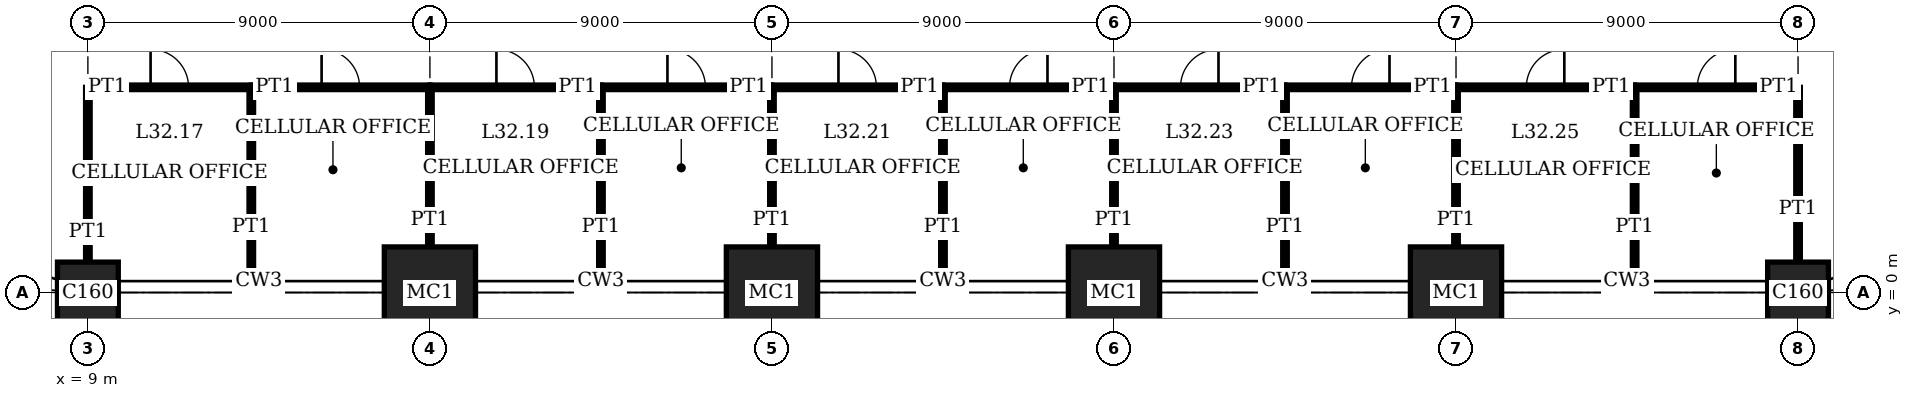
"""IFC4 building model, lengths in metres.
Left out: names, types, materials, properties, quantities, classifications, styles, units other than length and angle.
Written with IfcOpenShell. Run it as: python <this file> out.ifc"""

import sys

from ifc_helpers import new_model, si_unit, direction, frame, frame_2d, origin, origin_2d, place, context, subcontext, project, spatial, rectangle, extrude, element, fill, save


model = new_model("IFC4")
c1 = context("Model", 3, precision=1e-05, world=origin(), true_north=direction((0.0, 1.0)))
c2 = subcontext(c1, "Body", "Model", "MODEL_VIEW")
j1 = project(units=[si_unit("LENGTHUNIT", "METRE"), si_unit("PLANEANGLEUNIT", "RADIAN")], contexts=[c1])
p1 = place(None, origin())
s1 = spatial("IfcSite", under=j1, at=p1, CompositionType="ELEMENT")
p2 = place(p1, origin())
s2 = spatial("IfcBuilding", under=s1, at=p2, CompositionType="ELEMENT")
p3 = place(p2, frame((0.0, 0.0, 133.0)))
s3 = spatial("IfcBuildingStorey", under=s2, at=p3, CompositionType="ELEMENT", Elevation=133.0)
p4 = place(p3, frame((9.0, 0.0, 0.0), z_axis=(0.0, 0.0, 1.0), x_axis=(1.0, 0.0, 0.0)))
e1 = element("IfcColumn", 1, at=p4, inside=s3, PredefinedType="COLUMN", context=c2, shape_type="SweptSolid", body=[
    extrude(rectangle(XDim=1.6, YDim=1.6, at=origin_2d()), origin(), (0.0, 0.0, 1.0), 4.0),
])
for number, where, z_axis, x_axis in (
    (2, (18.0, 0.0, 0.0), (0.0, 0.0, 1.0), (1.0, 0.0, 0.0)),
    (3, (27.0, 0.0, 0.0), (0.0, 0.0, 1.0), (1.0, 0.0, 0.0)),
    (4, (36.0, 0.0, 0.0), (0.0, 0.0, 1.0), (1.0, 0.0, 0.0)),
    (5, (45.0, 0.0, 0.0), (0.0, 0.0, 1.0), (1.0, 0.0, 0.0)),
):
    element("IfcColumn", number, at=place(p3, frame(where, z_axis=z_axis, x_axis=x_axis)), inside=s3, PredefinedType="COLUMN", context=c2, shape_type="SweptSolid", body=[
        extrude(rectangle(XDim=2.4, YDim=2.4, at=origin_2d()), origin(), (0.0, 0.0, 1.0), 4.0),
    ])
p5 = place(p3, frame((54.0, 0.0, 0.0), z_axis=(0.0, 0.0, 1.0), x_axis=(1.0, 0.0, 0.0)))
e6 = element("IfcColumn", 6, at=p5, inside=s3, PredefinedType="COLUMN", context=c2, shape_type="SweptSolid", body=[
    extrude(rectangle(XDim=1.6, YDim=1.6, at=origin_2d()), origin(), (0.0, 0.0, 1.0), 4.0),
])
p6 = place(p3, frame((9.0, 5.4, 0.0), z_axis=(0.0, 0.0, 1.0), x_axis=(1.0, 0.0, 0.0)))
e7 = element("IfcWall", 7, at=p6, inside=s3, PredefinedType="PARTITIONING", context=c2, shape_type="SweptSolid", body=[
    extrude(rectangle(XDim=4.3, YDim=0.12, at=frame_2d((2.15, 0.0))), origin(), (0.0, 0.0, 1.0), 3.75),
])
p7 = place(p6, frame((1.65, 0.0, 0.0)))
e8 = element("IfcOpeningElement", 8, at=p7, cuts=e7, PredefinedType="OPENING", context=c2, shape_type="SweptSolid", body=[
    extrude(rectangle(XDim=1.0, YDim=2.4, at=frame_2d((0.5, 1.2))), frame((0.0, 0.07, 0.0), z_axis=(0.0, -1.0, 0.0), x_axis=(1.0, 0.0, 0.0)), (0.0, 0.0, 1.0), 0.14),
])
p8 = place(p3, frame((13.3, 5.4, 0.0), z_axis=(0.0, 0.0, 1.0), x_axis=(1.0, 0.0, 0.0)))
e9 = element("IfcWall", 9, at=p8, inside=s3, PredefinedType="PARTITIONING", context=c2, shape_type="SweptSolid", body=[
    extrude(rectangle(XDim=4.7, YDim=0.12, at=frame_2d((2.35, 0.0))), origin(), (0.0, 0.0, 1.0), 3.75),
])
p9 = place(p8, frame((1.85, 0.0, 0.0)))
e10 = element("IfcOpeningElement", 10, at=p9, cuts=e9, PredefinedType="OPENING", context=c2, shape_type="SweptSolid", body=[
    extrude(rectangle(XDim=1.0, YDim=2.4, at=frame_2d((0.5, 1.2))), frame((0.0, 0.07, 0.0), z_axis=(0.0, -1.0, 0.0), x_axis=(1.0, 0.0, 0.0)), (0.0, 0.0, 1.0), 0.14),
])
p10 = place(p3, frame((18.0, 5.4, 0.0), z_axis=(0.0, 0.0, 1.0), x_axis=(1.0, 0.0, 0.0)))
e11 = element("IfcWall", 11, at=p10, inside=s3, PredefinedType="PARTITIONING", context=c2, shape_type="SweptSolid", body=[
    extrude(rectangle(XDim=4.5, YDim=0.12, at=frame_2d((2.25, 0.0))), origin(), (0.0, 0.0, 1.0), 3.75),
])
p11 = place(p10, frame((1.75, 0.0, 0.0)))
e12 = element("IfcOpeningElement", 12, at=p11, cuts=e11, PredefinedType="OPENING", context=c2, shape_type="SweptSolid", body=[
    extrude(rectangle(XDim=1.0, YDim=2.4, at=frame_2d((0.5, 1.2))), frame((0.0, 0.07, 0.0), z_axis=(0.0, -1.0, 0.0), x_axis=(1.0, 0.0, 0.0)), (0.0, 0.0, 1.0), 0.14),
])
p12 = place(p3, frame((22.5, 5.4, 0.0), z_axis=(0.0, 0.0, 1.0), x_axis=(1.0, 0.0, 0.0)))
e13 = element("IfcWall", 13, at=p12, inside=s3, PredefinedType="PARTITIONING", context=c2, shape_type="SweptSolid", body=[
    extrude(rectangle(XDim=4.5, YDim=0.12, at=frame_2d((2.25, 0.0))), origin(), (0.0, 0.0, 1.0), 3.75),
])
p13 = place(p12, frame((1.75, 0.0, 0.0)))
e14 = element("IfcOpeningElement", 14, at=p13, cuts=e13, PredefinedType="OPENING", context=c2, shape_type="SweptSolid", body=[
    extrude(rectangle(XDim=1.0, YDim=2.4, at=frame_2d((0.5, 1.2))), frame((0.0, 0.07, 0.0), z_axis=(0.0, -1.0, 0.0), x_axis=(1.0, 0.0, 0.0)), (0.0, 0.0, 1.0), 0.14),
])
p14 = place(p3, frame((27.0, 5.4, 0.0), z_axis=(0.0, 0.0, 1.0), x_axis=(1.0, 0.0, 0.0)))
e15 = element("IfcWall", 15, at=p14, inside=s3, PredefinedType="PARTITIONING", context=c2, shape_type="SweptSolid", body=[
    extrude(rectangle(XDim=4.5, YDim=0.12, at=frame_2d((2.25, 0.0))), origin(), (0.0, 0.0, 1.0), 3.75),
])
p15 = place(p14, frame((1.75, 0.0, 0.0)))
e16 = element("IfcOpeningElement", 16, at=p15, cuts=e15, PredefinedType="OPENING", context=c2, shape_type="SweptSolid", body=[
    extrude(rectangle(XDim=1.0, YDim=2.4, at=frame_2d((0.5, 1.2))), frame((0.0, 0.07, 0.0), z_axis=(0.0, -1.0, 0.0), x_axis=(1.0, 0.0, 0.0)), (0.0, 0.0, 1.0), 0.14),
])
p16 = place(p3, frame((31.5, 5.4, 0.0), z_axis=(0.0, 0.0, 1.0), x_axis=(1.0, 0.0, 0.0)))
e17 = element("IfcWall", 17, at=p16, inside=s3, PredefinedType="PARTITIONING", context=c2, shape_type="SweptSolid", body=[
    extrude(rectangle(XDim=4.5, YDim=0.12, at=frame_2d((2.25, 0.0))), origin(), (0.0, 0.0, 1.0), 3.75),
])
p17 = place(p16, frame((1.75, 0.0, 0.0)))
e18 = element("IfcOpeningElement", 18, at=p17, cuts=e17, PredefinedType="OPENING", context=c2, shape_type="SweptSolid", body=[
    extrude(rectangle(XDim=1.0, YDim=2.4, at=frame_2d((0.5, 1.2))), frame((0.0, 0.07, 0.0), z_axis=(0.0, -1.0, 0.0), x_axis=(1.0, 0.0, 0.0)), (0.0, 0.0, 1.0), 0.14),
])
p18 = place(p3, frame((36.0, 5.4, 0.0), z_axis=(0.0, 0.0, 1.0), x_axis=(1.0, 0.0, 0.0)))
e19 = element("IfcWall", 19, at=p18, inside=s3, PredefinedType="PARTITIONING", context=c2, shape_type="SweptSolid", body=[
    extrude(rectangle(XDim=4.5, YDim=0.12, at=frame_2d((2.25, 0.0))), origin(), (0.0, 0.0, 1.0), 3.75),
])
p19 = place(p18, frame((1.75, 0.0, 0.0)))
e20 = element("IfcOpeningElement", 20, at=p19, cuts=e19, PredefinedType="OPENING", context=c2, shape_type="SweptSolid", body=[
    extrude(rectangle(XDim=1.0, YDim=2.4, at=frame_2d((0.5, 1.2))), frame((0.0, 0.07, 0.0), z_axis=(0.0, -1.0, 0.0), x_axis=(1.0, 0.0, 0.0)), (0.0, 0.0, 1.0), 0.14),
])
p20 = place(p3, frame((40.5, 5.4, 0.0), z_axis=(0.0, 0.0, 1.0), x_axis=(1.0, 0.0, 0.0)))
e21 = element("IfcWall", 21, at=p20, inside=s3, PredefinedType="PARTITIONING", context=c2, shape_type="SweptSolid", body=[
    extrude(rectangle(XDim=4.5, YDim=0.12, at=frame_2d((2.25, 0.0))), origin(), (0.0, 0.0, 1.0), 3.75),
])
p21 = place(p20, frame((1.75, 0.0, 0.0)))
e22 = element("IfcOpeningElement", 22, at=p21, cuts=e21, PredefinedType="OPENING", context=c2, shape_type="SweptSolid", body=[
    extrude(rectangle(XDim=1.0, YDim=2.4, at=frame_2d((0.5, 1.2))), frame((0.0, 0.07, 0.0), z_axis=(0.0, -1.0, 0.0), x_axis=(1.0, 0.0, 0.0)), (0.0, 0.0, 1.0), 0.14),
])
p22 = place(p3, frame((45.0, 5.4, 0.0), z_axis=(0.0, 0.0, 1.0), x_axis=(1.0, 0.0, 0.0)))
e23 = element("IfcWall", 23, at=p22, inside=s3, PredefinedType="PARTITIONING", context=c2, shape_type="SweptSolid", body=[
    extrude(rectangle(XDim=4.7, YDim=0.12, at=frame_2d((2.35, 0.0))), origin(), (0.0, 0.0, 1.0), 3.75),
])
p23 = place(p22, frame((1.85, 0.0, 0.0)))
e24 = element("IfcOpeningElement", 24, at=p23, cuts=e23, PredefinedType="OPENING", context=c2, shape_type="SweptSolid", body=[
    extrude(rectangle(XDim=1.0, YDim=2.4, at=frame_2d((0.5, 1.2))), frame((0.0, 0.07, 0.0), z_axis=(0.0, -1.0, 0.0), x_axis=(1.0, 0.0, 0.0)), (0.0, 0.0, 1.0), 0.14),
])
p24 = place(p3, frame((49.7, 5.4, 0.0), z_axis=(0.0, 0.0, 1.0), x_axis=(1.0, 0.0, 0.0)))
e25 = element("IfcWall", 25, at=p24, inside=s3, PredefinedType="PARTITIONING", context=c2, shape_type="SweptSolid", body=[
    extrude(rectangle(XDim=4.3, YDim=0.12, at=frame_2d((2.15, 0.0))), origin(), (0.0, 0.0, 1.0), 3.75),
])
p25 = place(p24, frame((1.65, 0.0, 0.0)))
e26 = element("IfcOpeningElement", 26, at=p25, cuts=e25, PredefinedType="OPENING", context=c2, shape_type="SweptSolid", body=[
    extrude(rectangle(XDim=1.0, YDim=2.4, at=frame_2d((0.5, 1.2))), frame((0.0, 0.07, 0.0), z_axis=(0.0, -1.0, 0.0), x_axis=(1.0, 0.0, 0.0)), (0.0, 0.0, 1.0), 0.14),
])
p26 = place(p3, frame((9.0, 0.8, 0.0), z_axis=(0.0, 0.0, 1.0), x_axis=(0.0, 1.0, 0.0)))
e27 = element("IfcWall", 27, at=p26, inside=s3, PredefinedType="PARTITIONING", context=c2, shape_type="SweptSolid", body=[
    extrude(rectangle(XDim=4.6, YDim=0.12, at=frame_2d((2.3, 0.0))), origin(), (0.0, 0.0, 1.0), 3.05),
])
p27 = place(p3, frame((13.3, 0.31, 0.0), z_axis=(0.0, 0.0, 1.0), x_axis=(0.0, 1.0, 0.0)))
e28 = element("IfcWall", 28, at=p27, inside=s3, PredefinedType="PARTITIONING", context=c2, shape_type="SweptSolid", body=[
    extrude(rectangle(XDim=5.09, YDim=0.12, at=frame_2d((2.545, 0.0))), origin(), (0.0, 0.0, 1.0), 3.75),
])
p28 = place(p3, frame((18.0, 1.2, 0.0), z_axis=(0.0, 0.0, 1.0), x_axis=(0.0, 1.0, 0.0)))
e29 = element("IfcWall", 29, at=p28, inside=s3, PredefinedType="PARTITIONING", context=c2, shape_type="SweptSolid", body=[
    extrude(rectangle(XDim=4.2, YDim=0.12, at=frame_2d((2.1, 0.0))), origin(), (0.0, 0.0, 1.0), 3.05),
])
p29 = place(p3, frame((22.5, 0.31, 0.0), z_axis=(0.0, 0.0, 1.0), x_axis=(0.0, 1.0, 0.0)))
e30 = element("IfcWall", 30, at=p29, inside=s3, PredefinedType="PARTITIONING", context=c2, shape_type="SweptSolid", body=[
    extrude(rectangle(XDim=5.09, YDim=0.12, at=frame_2d((2.545, 0.0))), origin(), (0.0, 0.0, 1.0), 3.75),
])
p30 = place(p3, frame((27.0, 1.2, 0.0), z_axis=(0.0, 0.0, 1.0), x_axis=(0.0, 1.0, 0.0)))
e31 = element("IfcWall", 31, at=p30, inside=s3, PredefinedType="PARTITIONING", context=c2, shape_type="SweptSolid", body=[
    extrude(rectangle(XDim=4.2, YDim=0.12, at=frame_2d((2.1, 0.0))), origin(), (0.0, 0.0, 1.0), 3.05),
])
p31 = place(p3, frame((31.5, 0.31, 0.0), z_axis=(0.0, 0.0, 1.0), x_axis=(0.0, 1.0, 0.0)))
e32 = element("IfcWall", 32, at=p31, inside=s3, PredefinedType="PARTITIONING", context=c2, shape_type="SweptSolid", body=[
    extrude(rectangle(XDim=5.09, YDim=0.12, at=frame_2d((2.545, 0.0))), origin(), (0.0, 0.0, 1.0), 3.75),
])
p32 = place(p3, frame((36.0, 1.2, 0.0), z_axis=(0.0, 0.0, 1.0), x_axis=(0.0, 1.0, 0.0)))
e33 = element("IfcWall", 33, at=p32, inside=s3, PredefinedType="PARTITIONING", context=c2, shape_type="SweptSolid", body=[
    extrude(rectangle(XDim=4.2, YDim=0.12, at=frame_2d((2.1, 0.0))), origin(), (0.0, 0.0, 1.0), 3.05),
])
p33 = place(p3, frame((40.5, 0.31, 0.0), z_axis=(0.0, 0.0, 1.0), x_axis=(0.0, 1.0, 0.0)))
e34 = element("IfcWall", 34, at=p33, inside=s3, PredefinedType="PARTITIONING", context=c2, shape_type="SweptSolid", body=[
    extrude(rectangle(XDim=5.09, YDim=0.12, at=frame_2d((2.545, 0.0))), origin(), (0.0, 0.0, 1.0), 3.75),
])
p34 = place(p3, frame((45.0, 1.2, 0.0), z_axis=(0.0, 0.0, 1.0), x_axis=(0.0, 1.0, 0.0)))
e35 = element("IfcWall", 35, at=p34, inside=s3, PredefinedType="PARTITIONING", context=c2, shape_type="SweptSolid", body=[
    extrude(rectangle(XDim=4.2, YDim=0.12, at=frame_2d((2.1, 0.0))), origin(), (0.0, 0.0, 1.0), 3.05),
])
p35 = place(p3, frame((49.7, 0.31, 0.0), z_axis=(0.0, 0.0, 1.0), x_axis=(0.0, 1.0, 0.0)))
e36 = element("IfcWall", 36, at=p35, inside=s3, PredefinedType="PARTITIONING", context=c2, shape_type="SweptSolid", body=[
    extrude(rectangle(XDim=5.09, YDim=0.12, at=frame_2d((2.545, 0.0))), origin(), (0.0, 0.0, 1.0), 3.75),
])
p36 = place(p3, frame((54.0, 0.8, 0.0), z_axis=(0.0, 0.0, 1.0), x_axis=(0.0, 1.0, 0.0)))
e37 = element("IfcWall", 37, at=p36, inside=s3, PredefinedType="PARTITIONING", context=c2, shape_type="SweptSolid", body=[
    extrude(rectangle(XDim=4.6, YDim=0.12, at=frame_2d((2.3, 0.0))), origin(), (0.0, 0.0, 1.0), 3.05),
])
p37 = place(p7, origin())
e38 = element("IfcDoor", 38, at=p37, inside=s3, OperationType="SINGLE_SWING_RIGHT", PredefinedType="DOOR", context=c2, shape_type="SweptSolid", body=[
    extrude(rectangle(XDim=1.0, YDim=2.4, at=frame_2d((0.5, 1.2))), frame((0.0, 0.025, 0.0), z_axis=(0.0, -1.0, 0.0), x_axis=(1.0, 0.0, 0.0)), (0.0, 0.0, 1.0), 0.05),
])
fill(e8, e38)
p38 = place(p9, origin())
e39 = element("IfcDoor", 39, at=p38, inside=s3, OperationType="SINGLE_SWING_RIGHT", PredefinedType="DOOR", context=c2, shape_type="SweptSolid", body=[
    extrude(rectangle(XDim=1.0, YDim=2.4, at=frame_2d((0.5, 1.2))), frame((0.0, 0.025, 0.0), z_axis=(0.0, -1.0, 0.0), x_axis=(1.0, 0.0, 0.0)), (0.0, 0.0, 1.0), 0.05),
])
fill(e10, e39)
p39 = place(p11, origin())
e40 = element("IfcDoor", 40, at=p39, inside=s3, OperationType="SINGLE_SWING_RIGHT", PredefinedType="DOOR", context=c2, shape_type="SweptSolid", body=[
    extrude(rectangle(XDim=1.0, YDim=2.4, at=frame_2d((0.5, 1.2))), frame((0.0, 0.025, 0.0), z_axis=(0.0, -1.0, 0.0), x_axis=(1.0, 0.0, 0.0)), (0.0, 0.0, 1.0), 0.05),
])
fill(e12, e40)
p40 = place(p13, origin())
e41 = element("IfcDoor", 41, at=p40, inside=s3, OperationType="SINGLE_SWING_RIGHT", PredefinedType="DOOR", context=c2, shape_type="SweptSolid", body=[
    extrude(rectangle(XDim=1.0, YDim=2.4, at=frame_2d((0.5, 1.2))), frame((0.0, 0.025, 0.0), z_axis=(0.0, -1.0, 0.0), x_axis=(1.0, 0.0, 0.0)), (0.0, 0.0, 1.0), 0.05),
])
fill(e14, e41)
p41 = place(p15, origin())
e42 = element("IfcDoor", 42, at=p41, inside=s3, OperationType="SINGLE_SWING_RIGHT", PredefinedType="DOOR", context=c2, shape_type="SweptSolid", body=[
    extrude(rectangle(XDim=1.0, YDim=2.4, at=frame_2d((0.5, 1.2))), frame((0.0, 0.025, 0.0), z_axis=(0.0, -1.0, 0.0), x_axis=(1.0, 0.0, 0.0)), (0.0, 0.0, 1.0), 0.05),
])
fill(e16, e42)
p42 = place(p17, origin())
e43 = element("IfcDoor", 43, at=p42, inside=s3, OperationType="SINGLE_SWING_LEFT", PredefinedType="DOOR", context=c2, shape_type="SweptSolid", body=[
    extrude(rectangle(XDim=1.0, YDim=2.4, at=frame_2d((0.5, 1.2))), frame((0.0, 0.025, 0.0), z_axis=(0.0, -1.0, 0.0), x_axis=(1.0, 0.0, 0.0)), (0.0, 0.0, 1.0), 0.05),
])
fill(e18, e43)
p43 = place(p19, origin())
e44 = element("IfcDoor", 44, at=p43, inside=s3, OperationType="SINGLE_SWING_LEFT", PredefinedType="DOOR", context=c2, shape_type="SweptSolid", body=[
    extrude(rectangle(XDim=1.0, YDim=2.4, at=frame_2d((0.5, 1.2))), frame((0.0, 0.025, 0.0), z_axis=(0.0, -1.0, 0.0), x_axis=(1.0, 0.0, 0.0)), (0.0, 0.0, 1.0), 0.05),
])
fill(e20, e44)
p44 = place(p21, origin())
e45 = element("IfcDoor", 45, at=p44, inside=s3, OperationType="SINGLE_SWING_LEFT", PredefinedType="DOOR", context=c2, shape_type="SweptSolid", body=[
    extrude(rectangle(XDim=1.0, YDim=2.4, at=frame_2d((0.5, 1.2))), frame((0.0, 0.025, 0.0), z_axis=(0.0, -1.0, 0.0), x_axis=(1.0, 0.0, 0.0)), (0.0, 0.0, 1.0), 0.05),
])
fill(e22, e45)
p45 = place(p23, origin())
e46 = element("IfcDoor", 46, at=p45, inside=s3, OperationType="SINGLE_SWING_LEFT", PredefinedType="DOOR", context=c2, shape_type="SweptSolid", body=[
    extrude(rectangle(XDim=1.0, YDim=2.4, at=frame_2d((0.5, 1.2))), frame((0.0, 0.025, 0.0), z_axis=(0.0, -1.0, 0.0), x_axis=(1.0, 0.0, 0.0)), (0.0, 0.0, 1.0), 0.05),
])
fill(e24, e46)
p46 = place(p25, origin())
e47 = element("IfcDoor", 47, at=p46, inside=s3, OperationType="SINGLE_SWING_LEFT", PredefinedType="DOOR", context=c2, shape_type="SweptSolid", body=[
    extrude(rectangle(XDim=1.0, YDim=2.4, at=frame_2d((0.5, 1.2))), frame((0.0, 0.025, 0.0), z_axis=(0.0, -1.0, 0.0), x_axis=(1.0, 0.0, 0.0)), (0.0, 0.0, 1.0), 0.05),
])
fill(e26, e47)
save(model, sys.argv[1])
